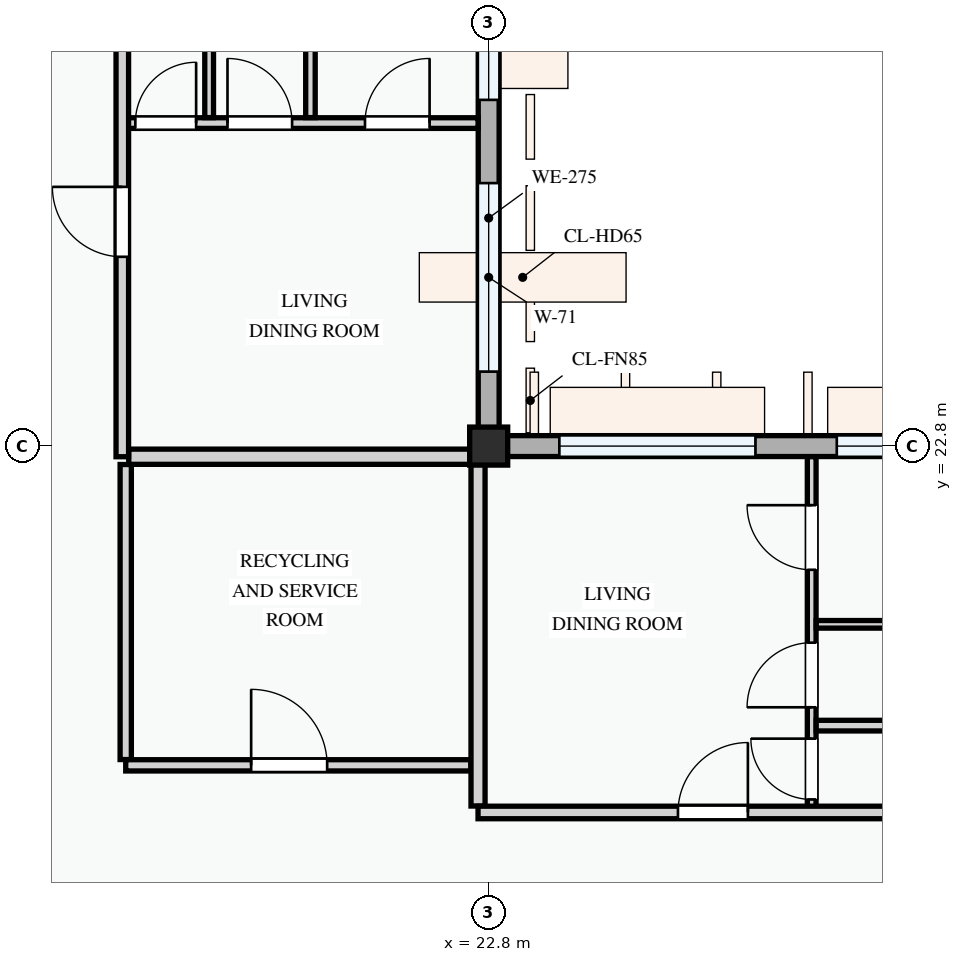
"""IFC4 building model, lengths in metres.
Left out: names, types, materials, properties, quantities, classifications, styles, units other than length and angle.
Written with IfcOpenShell. Run it as: python <this file> out.ifc"""

import sys

from ifc_helpers import new_model, si_unit, direction, frame, frame_2d, origin, origin_2d, place, context, subcontext, project, spatial, rectangle, extrude, element, fill, save


model = new_model("IFC4")
c1 = context("Model", 3, precision=1e-05, world=origin(), true_north=direction((0.0, 1.0)))
c2 = subcontext(c1, "Body", "Model", "MODEL_VIEW")
j1 = project(units=[si_unit("LENGTHUNIT", "METRE"), si_unit("PLANEANGLEUNIT", "RADIAN")], contexts=[c1])
p1 = place(None, origin())
s1 = spatial("IfcSite", under=j1, at=p1, CompositionType="ELEMENT")
p2 = place(p1, origin())
s2 = spatial("IfcBuilding", under=s1, at=p2, CompositionType="ELEMENT")
p3 = place(p2, frame((0.0, 0.0, 24.6)))
s3 = spatial("IfcBuildingStorey", under=s2, at=p3, CompositionType="ELEMENT", Elevation=24.6)
p4 = place(p3, frame((22.8, 22.8, 0.0), z_axis=(0.0, 0.0, 1.0), x_axis=(1.0, 0.0, 0.0)))
e1 = element("IfcColumn", 1, at=p4, inside=s3, PredefinedType="COLUMN", context=c2, shape_type="SweptSolid", body=[
    extrude(rectangle(XDim=0.5, YDim=0.5, at=origin_2d()), origin(), (0.0, 0.0, 1.0), 3.3),
])
p5 = place(p3, frame((22.8, 22.8, 0.0), z_axis=(0.0, 0.0, 1.0), x_axis=(0.0, 1.0, 0.0)))
e2 = element("IfcWall", 2, at=p5, inside=s3, PredefinedType="STANDARD", context=c2, shape_type="SweptSolid", body=[
    extrude(rectangle(XDim=6.0, YDim=0.275, at=frame_2d((3.0, 0.0))), origin(), (0.0, 0.0, 1.0), 2.575),
])
p6 = place(p5, frame((0.98, 0.0, 0.78)))
e3 = element("IfcOpeningElement", 3, at=p6, cuts=e2, PredefinedType="OPENING", context=c2, shape_type="SweptSolid", body=[
    extrude(rectangle(XDim=2.48, YDim=1.46, at=frame_2d((1.24, 0.73))), frame((0.0, 0.147, 0.0), z_axis=(0.0, -1.0, 0.0), x_axis=(1.0, 0.0, 0.0)), (0.0, 0.0, 1.0), 0.295),
])
p7 = place(p5, frame((4.555, 0.0, 0.78)))
e4 = element("IfcOpeningElement", 4, at=p7, cuts=e2, PredefinedType="OPENING", context=c2, shape_type="SweptSolid", body=[
    extrude(rectangle(XDim=0.95, YDim=1.15, at=frame_2d((0.475, 0.575))), frame((0.0, 0.147, 0.0), z_axis=(0.0, -1.0, 0.0), x_axis=(1.0, 0.0, 0.0)), (0.0, 0.0, 1.0), 0.295),
])
p8 = place(p3, frame((28.8, 22.8, 0.0), z_axis=(0.0, 0.0, 1.0), x_axis=(-1.0, 0.0, 0.0)))
e5 = element("IfcWall", 5, at=p8, inside=s3, PredefinedType="STANDARD", context=c2, shape_type="SweptSolid", body=[
    extrude(rectangle(XDim=6.0, YDim=0.275, at=frame_2d((3.0, 0.0))), origin(), (0.0, 0.0, 1.0), 2.475),
])
p9 = place(p8, frame((0.52, 0.0, 0.78)))
e6 = element("IfcOpeningElement", 6, at=p9, cuts=e5, PredefinedType="OPENING", context=c2, shape_type="SweptSolid", body=[
    extrude(rectangle(XDim=0.9, YDim=1.2, at=frame_2d((0.45, 0.6))), frame((0.0, 0.147, 0.0), z_axis=(0.0, -1.0, 0.0), x_axis=(1.0, 0.0, 0.0)), (0.0, 0.0, 1.0), 0.295),
])
p10 = place(p8, frame((2.49, 0.0, 0.78)))
e7 = element("IfcOpeningElement", 7, at=p10, cuts=e5, PredefinedType="OPENING", context=c2, shape_type="SweptSolid", body=[
    extrude(rectangle(XDim=2.58, YDim=1.48, at=frame_2d((1.29, 0.74))), frame((0.0, 0.147, 0.0), z_axis=(0.0, -1.0, 0.0), x_axis=(1.0, 0.0, 0.0)), (0.0, 0.0, 1.0), 0.295),
])
p11 = place(p3, frame((18.025, 18.676, 0.0), z_axis=(0.0, 0.0, 1.0), x_axis=(0.0, 1.0, 0.0)))
e8 = element("IfcWall", 8, at=p11, inside=s3, PredefinedType="PARTITIONING", context=c2, shape_type="SweptSolid", body=[
    extrude(rectangle(XDim=3.882, YDim=0.148, at=frame_2d((1.941, 0.0))), origin(), (0.0, 0.0, 1.0), 3.0),
])
p12 = place(p3, frame((18.025, 18.6, 0.0), z_axis=(0.0, 0.0, 1.0), x_axis=(1.0, 0.0, 0.0)))
e9 = element("IfcWall", 9, at=p12, inside=s3, PredefinedType="PARTITIONING", context=c2, shape_type="SweptSolid", body=[
    extrude(rectangle(XDim=4.541, YDim=0.148, at=frame_2d((2.27, 0.0))), origin(), (0.0, 0.0, 1.0), 3.0),
])
p13 = place(p12, frame((1.65, 0.0, 0.0)))
e10 = element("IfcOpeningElement", 10, at=p13, cuts=e9, PredefinedType="OPENING", context=c2, shape_type="SweptSolid", body=[
    extrude(rectangle(XDim=1.0, YDim=2.15, at=frame_2d((0.5, 1.075))), frame((0.0, 0.084, 0.0), z_axis=(0.0, -1.0, 0.0), x_axis=(1.0, 0.0, 0.0)), (0.0, 0.0, 1.0), 0.168),
])
p14 = place(p3, frame((17.98, 27.05, 0.0), z_axis=(0.0, 0.0, 1.0), x_axis=(1.0, 0.0, 0.0)))
e11 = element("IfcWall", 11, at=p14, inside=s3, PredefinedType="PARTITIONING", context=c2, shape_type="SweptSolid", body=[
    extrude(rectangle(XDim=4.68, YDim=0.14, at=frame_2d((2.34, 0.0))), origin(), (0.0, 0.0, 1.0), 3.0),
])
p15 = place(p14, frame((0.171, 0.0, 0.0)))
e12 = element("IfcOpeningElement", 12, at=p15, cuts=e11, PredefinedType="OPENING", context=c2, shape_type="SweptSolid", body=[
    extrude(rectangle(XDim=0.8, YDim=2.1, at=frame_2d((0.4, 1.05))), frame((0.0, 0.08, 0.0), z_axis=(0.0, -1.0, 0.0), x_axis=(1.0, 0.0, 0.0)), (0.0, 0.0, 1.0), 0.16),
])
p16 = place(p14, frame((1.384, 0.0, 0.0)))
e13 = element("IfcOpeningElement", 13, at=p16, cuts=e11, PredefinedType="OPENING", context=c2, shape_type="SweptSolid", body=[
    extrude(rectangle(XDim=0.85, YDim=2.1, at=frame_2d((0.425, 1.05))), frame((0.0, 0.08, 0.0), z_axis=(0.0, -1.0, 0.0), x_axis=(1.0, 0.0, 0.0)), (0.0, 0.0, 1.0), 0.16),
])
p17 = place(p14, frame((3.193, 0.0, 0.0)))
e14 = element("IfcOpeningElement", 14, at=p17, cuts=e11, PredefinedType="OPENING", context=c2, shape_type="SweptSolid", body=[
    extrude(rectangle(XDim=0.85, YDim=2.1, at=frame_2d((0.425, 1.05))), frame((0.0, 0.08, 0.0), z_axis=(0.0, -1.0, 0.0), x_axis=(1.0, 0.0, 0.0)), (0.0, 0.0, 1.0), 0.16),
])
p18 = place(p3, frame((20.455, 27.122, 0.0), z_axis=(0.0, 0.0, 1.0), x_axis=(0.0, 1.0, 0.0)))
e15 = element("IfcWall", 15, at=p18, inside=s3, PredefinedType="PARTITIONING", context=c2, shape_type="SweptSolid", body=[
    extrude(rectangle(XDim=5.214, YDim=0.125, at=frame_2d((2.607, 0.0))), origin(), (0.0, 0.0, 1.0), 3.0),
])
p19 = place(p3, frame((19.122, 27.122, 0.0), z_axis=(0.0, 0.0, 1.0), x_axis=(0.0, 1.0, 0.0)))
e16 = element("IfcWall", 16, at=p19, inside=s3, PredefinedType="PARTITIONING", context=c2, shape_type="SweptSolid", body=[
    extrude(rectangle(XDim=5.214, YDim=0.115, at=frame_2d((2.607, 0.0))), origin(), (0.0, 0.0, 1.0), 3.0),
])
p20 = place(p3, frame((18.064, 22.66, 0.0), z_axis=(0.0, 0.0, 1.0), x_axis=(1.0, 0.0, 0.0)))
e17 = element("IfcWall", 17, at=p20, inside=s3, PredefinedType="PARTITIONING", context=c2, shape_type="SweptSolid", body=[
    extrude(rectangle(XDim=4.501, YDim=0.2, at=frame_2d((2.25, 0.0))), origin(), (0.0, 0.0, 1.0), 2.375),
])
p21 = place(p3, frame((17.98, 22.66, 0.0), z_axis=(0.0, 0.0, 1.0), x_axis=(0.0, 1.0, 0.0)))
e18 = element("IfcWall", 18, at=p21, inside=s3, PredefinedType="PARTITIONING", context=c2, shape_type="SweptSolid", body=[
    extrude(rectangle(XDim=34.801, YDim=0.165, at=frame_2d((17.4, 0.0))), origin(), (0.0, 0.0, 1.0), 3.0),
])
p22 = place(p21, frame((2.63, 0.0, 0.0)))
e19 = element("IfcOpeningElement", 19, at=p22, cuts=e18, PredefinedType="OPENING", context=c2, shape_type="SweptSolid", body=[
    extrude(rectangle(XDim=0.92, YDim=2.1, at=frame_2d((0.46, 1.05))), frame((0.0, 0.093, 0.0), z_axis=(0.0, -1.0, 0.0), x_axis=(1.0, 0.0, 0.0)), (0.0, 0.0, 1.0), 0.185),
])
p23 = place(p21, frame((10.02, 0.0, 0.0)))
e20 = element("IfcOpeningElement", 20, at=p23, cuts=e18, PredefinedType="OPENING", context=c2, shape_type="SweptSolid", body=[
    extrude(rectangle(XDim=0.92, YDim=2.1, at=frame_2d((0.46, 1.05))), frame((0.0, 0.093, 0.0), z_axis=(0.0, -1.0, 0.0), x_axis=(1.0, 0.0, 0.0)), (0.0, 0.0, 1.0), 0.185),
])
p24 = place(p21, frame((24.289, 0.0, 0.0)))
e21 = element("IfcOpeningElement", 21, at=p24, cuts=e18, PredefinedType="OPENING", context=c2, shape_type="SweptSolid", body=[
    extrude(rectangle(XDim=0.96, YDim=2.12, at=frame_2d((0.48, 1.06))), frame((0.0, 0.093, 0.0), z_axis=(0.0, -1.0, 0.0), x_axis=(1.0, 0.0, 0.0)), (0.0, 0.0, 1.0), 0.185),
])
p25 = place(p3, frame((27.05, 17.98, 0.0), z_axis=(0.0, 0.0, 1.0), x_axis=(0.0, 1.0, 0.0)))
e22 = element("IfcWall", 22, at=p25, inside=s3, PredefinedType="PARTITIONING", context=c2, shape_type="SweptSolid", body=[
    extrude(rectangle(XDim=4.68, YDim=0.115, at=frame_2d((2.34, 0.0))), origin(), (0.0, 0.0, 1.0), 3.0),
])
p26 = place(p25, frame((0.171, 0.0, 0.0)))
e23 = element("IfcOpeningElement", 23, at=p26, cuts=e22, PredefinedType="OPENING", context=c2, shape_type="SweptSolid", body=[
    extrude(rectangle(XDim=0.8, YDim=2.1, at=frame_2d((0.4, 1.05))), frame((0.0, 0.067, 0.0), z_axis=(0.0, -1.0, 0.0), x_axis=(1.0, 0.0, 0.0)), (0.0, 0.0, 1.0), 0.135),
])
p27 = place(p25, frame((1.384, 0.0, 0.0)))
e24 = element("IfcOpeningElement", 24, at=p27, cuts=e22, PredefinedType="OPENING", context=c2, shape_type="SweptSolid", body=[
    extrude(rectangle(XDim=0.85, YDim=2.1, at=frame_2d((0.425, 1.05))), frame((0.0, 0.067, 0.0), z_axis=(0.0, -1.0, 0.0), x_axis=(1.0, 0.0, 0.0)), (0.0, 0.0, 1.0), 0.135),
])
p28 = place(p25, frame((3.193, 0.0, 0.0)))
e25 = element("IfcOpeningElement", 25, at=p28, cuts=e22, PredefinedType="OPENING", context=c2, shape_type="SweptSolid", body=[
    extrude(rectangle(XDim=0.85, YDim=2.1, at=frame_2d((0.425, 1.05))), frame((0.0, 0.067, 0.0), z_axis=(0.0, -1.0, 0.0), x_axis=(1.0, 0.0, 0.0)), (0.0, 0.0, 1.0), 0.135),
])
p29 = place(p3, frame((27.109, 20.455, 0.0), z_axis=(0.0, 0.0, 1.0), x_axis=(1.0, 0.0, 0.0)))
e26 = element("IfcWall", 26, at=p29, inside=s3, PredefinedType="PARTITIONING", context=c2, shape_type="SweptSolid", body=[
    extrude(rectangle(XDim=5.209, YDim=0.1, at=frame_2d((2.604, 0.0))), origin(), (0.0, 0.0, 1.0), 3.0),
])
p30 = place(p3, frame((27.109, 19.122, 0.0), z_axis=(0.0, 0.0, 1.0), x_axis=(1.0, 0.0, 0.0)))
e27 = element("IfcWall", 27, at=p30, inside=s3, PredefinedType="PARTITIONING", context=c2, shape_type="SweptSolid", body=[
    extrude(rectangle(XDim=5.209, YDim=0.14, at=frame_2d((2.604, 0.0))), origin(), (0.0, 0.0, 1.0), 3.0),
])
p31 = place(p3, frame((22.66, 18.064, 0.0), z_axis=(0.0, 0.0, 1.0), x_axis=(0.0, 1.0, 0.0)))
e28 = element("IfcWall", 28, at=p31, inside=s3, PredefinedType="PARTITIONING", context=c2, shape_type="SweptSolid", body=[
    extrude(rectangle(XDim=4.676, YDim=0.185, at=frame_2d((2.338, 0.0))), origin(), (0.0, 0.0, 1.0), 2.425),
])
p32 = place(p3, frame((22.66, 17.98, 0.0), z_axis=(0.0, 0.0, 1.0), x_axis=(1.0, 0.0, 0.0)))
e29 = element("IfcWall", 29, at=p32, inside=s3, PredefinedType="PARTITIONING", context=c2, shape_type="SweptSolid", body=[
    extrude(rectangle(XDim=34.88, YDim=0.165, at=frame_2d((17.44, 0.0))), origin(), (0.0, 0.0, 1.0), 3.0),
])
p33 = place(p32, frame((2.63, 0.0, 0.0)))
e30 = element("IfcOpeningElement", 30, at=p33, cuts=e29, PredefinedType="OPENING", context=c2, shape_type="SweptSolid", body=[
    extrude(rectangle(XDim=0.92, YDim=2.1, at=frame_2d((0.46, 1.05))), frame((0.0, 0.093, 0.0), z_axis=(0.0, -1.0, 0.0), x_axis=(1.0, 0.0, 0.0)), (0.0, 0.0, 1.0), 0.185),
])
p34 = place(p32, frame((10.02, 0.0, 0.0)))
e31 = element("IfcOpeningElement", 31, at=p34, cuts=e29, PredefinedType="OPENING", context=c2, shape_type="SweptSolid", body=[
    extrude(rectangle(XDim=0.92, YDim=2.1, at=frame_2d((0.46, 1.05))), frame((0.0, 0.093, 0.0), z_axis=(0.0, -1.0, 0.0), x_axis=(1.0, 0.0, 0.0)), (0.0, 0.0, 1.0), 0.185),
])
p35 = place(p32, frame((24.289, 0.0, 0.0)))
e32 = element("IfcOpeningElement", 32, at=p35, cuts=e29, PredefinedType="OPENING", context=c2, shape_type="SweptSolid", body=[
    extrude(rectangle(XDim=0.92, YDim=2.1, at=frame_2d((0.46, 1.05))), frame((0.0, 0.093, 0.0), z_axis=(0.0, -1.0, 0.0), x_axis=(1.0, 0.0, 0.0)), (0.0, 0.0, 1.0), 0.185),
])
p36 = place(p6, origin())
e33 = element("IfcWindow", 33, at=p36, inside=s3, PartitioningType="DOUBLE_PANEL_VERTICAL", PredefinedType="WINDOW", context=c2, shape_type="SweptSolid", body=[
    extrude(rectangle(XDim=2.48, YDim=1.46, at=frame_2d((1.24, 0.73))), frame((0.0, 0.03, 0.0), z_axis=(0.0, -1.0, 0.0), x_axis=(1.0, 0.0, 0.0)), (0.0, 0.0, 1.0), 0.06),
])
fill(e3, e33)
p37 = place(p7, origin())
e34 = element("IfcWindow", 34, at=p37, inside=s3, PartitioningType="SINGLE_PANEL", PredefinedType="WINDOW", context=c2, shape_type="SweptSolid", body=[
    extrude(rectangle(XDim=0.95, YDim=1.15, at=frame_2d((0.475, 0.575))), frame((0.0, 0.03, 0.0), z_axis=(0.0, -1.0, 0.0), x_axis=(1.0, 0.0, 0.0)), (0.0, 0.0, 1.0), 0.06),
])
fill(e4, e34)
p38 = place(p9, origin())
e35 = element("IfcWindow", 35, at=p38, inside=s3, PartitioningType="SINGLE_PANEL", PredefinedType="WINDOW", context=c2, shape_type="SweptSolid", body=[
    extrude(rectangle(XDim=0.9, YDim=1.2, at=frame_2d((0.45, 0.6))), frame((0.0, 0.03, 0.0), z_axis=(0.0, -1.0, 0.0), x_axis=(1.0, 0.0, 0.0)), (0.0, 0.0, 1.0), 0.06),
])
fill(e6, e35)
p39 = place(p10, origin())
e36 = element("IfcWindow", 36, at=p39, inside=s3, PartitioningType="DOUBLE_PANEL_VERTICAL", PredefinedType="WINDOW", context=c2, shape_type="SweptSolid", body=[
    extrude(rectangle(XDim=2.58, YDim=1.48, at=frame_2d((1.29, 0.74))), frame((0.0, 0.03, 0.0), z_axis=(0.0, -1.0, 0.0), x_axis=(1.0, 0.0, 0.0)), (0.0, 0.0, 1.0), 0.06),
])
fill(e7, e36)
p40 = place(p13, origin())
e37 = element("IfcDoor", 37, at=p40, inside=s3, OperationType="SINGLE_SWING_LEFT", PredefinedType="DOOR", context=c2, shape_type="SweptSolid", body=[
    extrude(rectangle(XDim=1.0, YDim=2.15, at=frame_2d((0.5, 1.075))), frame((0.0, 0.025, 0.0), z_axis=(0.0, -1.0, 0.0), x_axis=(1.0, 0.0, 0.0)), (0.0, 0.0, 1.0), 0.05),
])
fill(e10, e37)
p41 = place(p15, origin())
e38 = element("IfcDoor", 38, at=p41, inside=s3, OperationType="SINGLE_SWING_RIGHT", PredefinedType="DOOR", context=c2, shape_type="SweptSolid", body=[
    extrude(rectangle(XDim=0.8, YDim=2.1, at=frame_2d((0.4, 1.05))), frame((0.0, 0.025, 0.0), z_axis=(0.0, -1.0, 0.0), x_axis=(1.0, 0.0, 0.0)), (0.0, 0.0, 1.0), 0.05),
])
fill(e12, e38)
p42 = place(p16, origin())
e39 = element("IfcDoor", 39, at=p42, inside=s3, OperationType="SINGLE_SWING_LEFT", PredefinedType="DOOR", context=c2, shape_type="SweptSolid", body=[
    extrude(rectangle(XDim=0.85, YDim=2.1, at=frame_2d((0.425, 1.05))), frame((0.0, 0.025, 0.0), z_axis=(0.0, -1.0, 0.0), x_axis=(1.0, 0.0, 0.0)), (0.0, 0.0, 1.0), 0.05),
])
fill(e13, e39)
p43 = place(p17, origin())
e40 = element("IfcDoor", 40, at=p43, inside=s3, OperationType="SINGLE_SWING_RIGHT", PredefinedType="DOOR", context=c2, shape_type="SweptSolid", body=[
    extrude(rectangle(XDim=0.85, YDim=2.1, at=frame_2d((0.425, 1.05))), frame((0.0, 0.025, 0.0), z_axis=(0.0, -1.0, 0.0), x_axis=(1.0, 0.0, 0.0)), (0.0, 0.0, 1.0), 0.05),
])
fill(e14, e40)
p44 = place(p22, origin())
e41 = element("IfcDoor", 41, at=p44, inside=s3, OperationType="SINGLE_SWING_RIGHT", PredefinedType="DOOR", context=c2, shape_type="SweptSolid", body=[
    extrude(rectangle(XDim=0.92, YDim=2.1, at=frame_2d((0.46, 1.05))), frame((0.0, 0.025, 0.0), z_axis=(0.0, -1.0, 0.0), x_axis=(1.0, 0.0, 0.0)), (0.0, 0.0, 1.0), 0.05),
])
fill(e19, e41)
p45 = place(p26, origin())
e42 = element("IfcDoor", 42, at=p45, inside=s3, OperationType="SINGLE_SWING_RIGHT", PredefinedType="DOOR", context=c2, shape_type="SweptSolid", body=[
    extrude(rectangle(XDim=0.8, YDim=2.1, at=frame_2d((0.4, 1.05))), frame((0.0, 0.025, 0.0), z_axis=(0.0, -1.0, 0.0), x_axis=(1.0, 0.0, 0.0)), (0.0, 0.0, 1.0), 0.05),
])
fill(e23, e42)
p46 = place(p27, origin())
e43 = element("IfcDoor", 43, at=p46, inside=s3, OperationType="SINGLE_SWING_LEFT", PredefinedType="DOOR", context=c2, shape_type="SweptSolid", body=[
    extrude(rectangle(XDim=0.85, YDim=2.1, at=frame_2d((0.425, 1.05))), frame((0.0, 0.025, 0.0), z_axis=(0.0, -1.0, 0.0), x_axis=(1.0, 0.0, 0.0)), (0.0, 0.0, 1.0), 0.05),
])
fill(e24, e43)
p47 = place(p28, origin())
e44 = element("IfcDoor", 44, at=p47, inside=s3, OperationType="SINGLE_SWING_RIGHT", PredefinedType="DOOR", context=c2, shape_type="SweptSolid", body=[
    extrude(rectangle(XDim=0.85, YDim=2.1, at=frame_2d((0.425, 1.05))), frame((0.0, 0.025, 0.0), z_axis=(0.0, -1.0, 0.0), x_axis=(1.0, 0.0, 0.0)), (0.0, 0.0, 1.0), 0.05),
])
fill(e25, e44)
p48 = place(p33, origin())
e45 = element("IfcDoor", 45, at=p48, inside=s3, OperationType="SINGLE_SWING_RIGHT", PredefinedType="DOOR", context=c2, shape_type="SweptSolid", body=[
    extrude(rectangle(XDim=0.92, YDim=2.1, at=frame_2d((0.46, 1.05))), frame((0.0, 0.025, 0.0), z_axis=(0.0, -1.0, 0.0), x_axis=(1.0, 0.0, 0.0)), (0.0, 0.0, 1.0), 0.05),
])
fill(e30, e45)
save(model, sys.argv[1])
